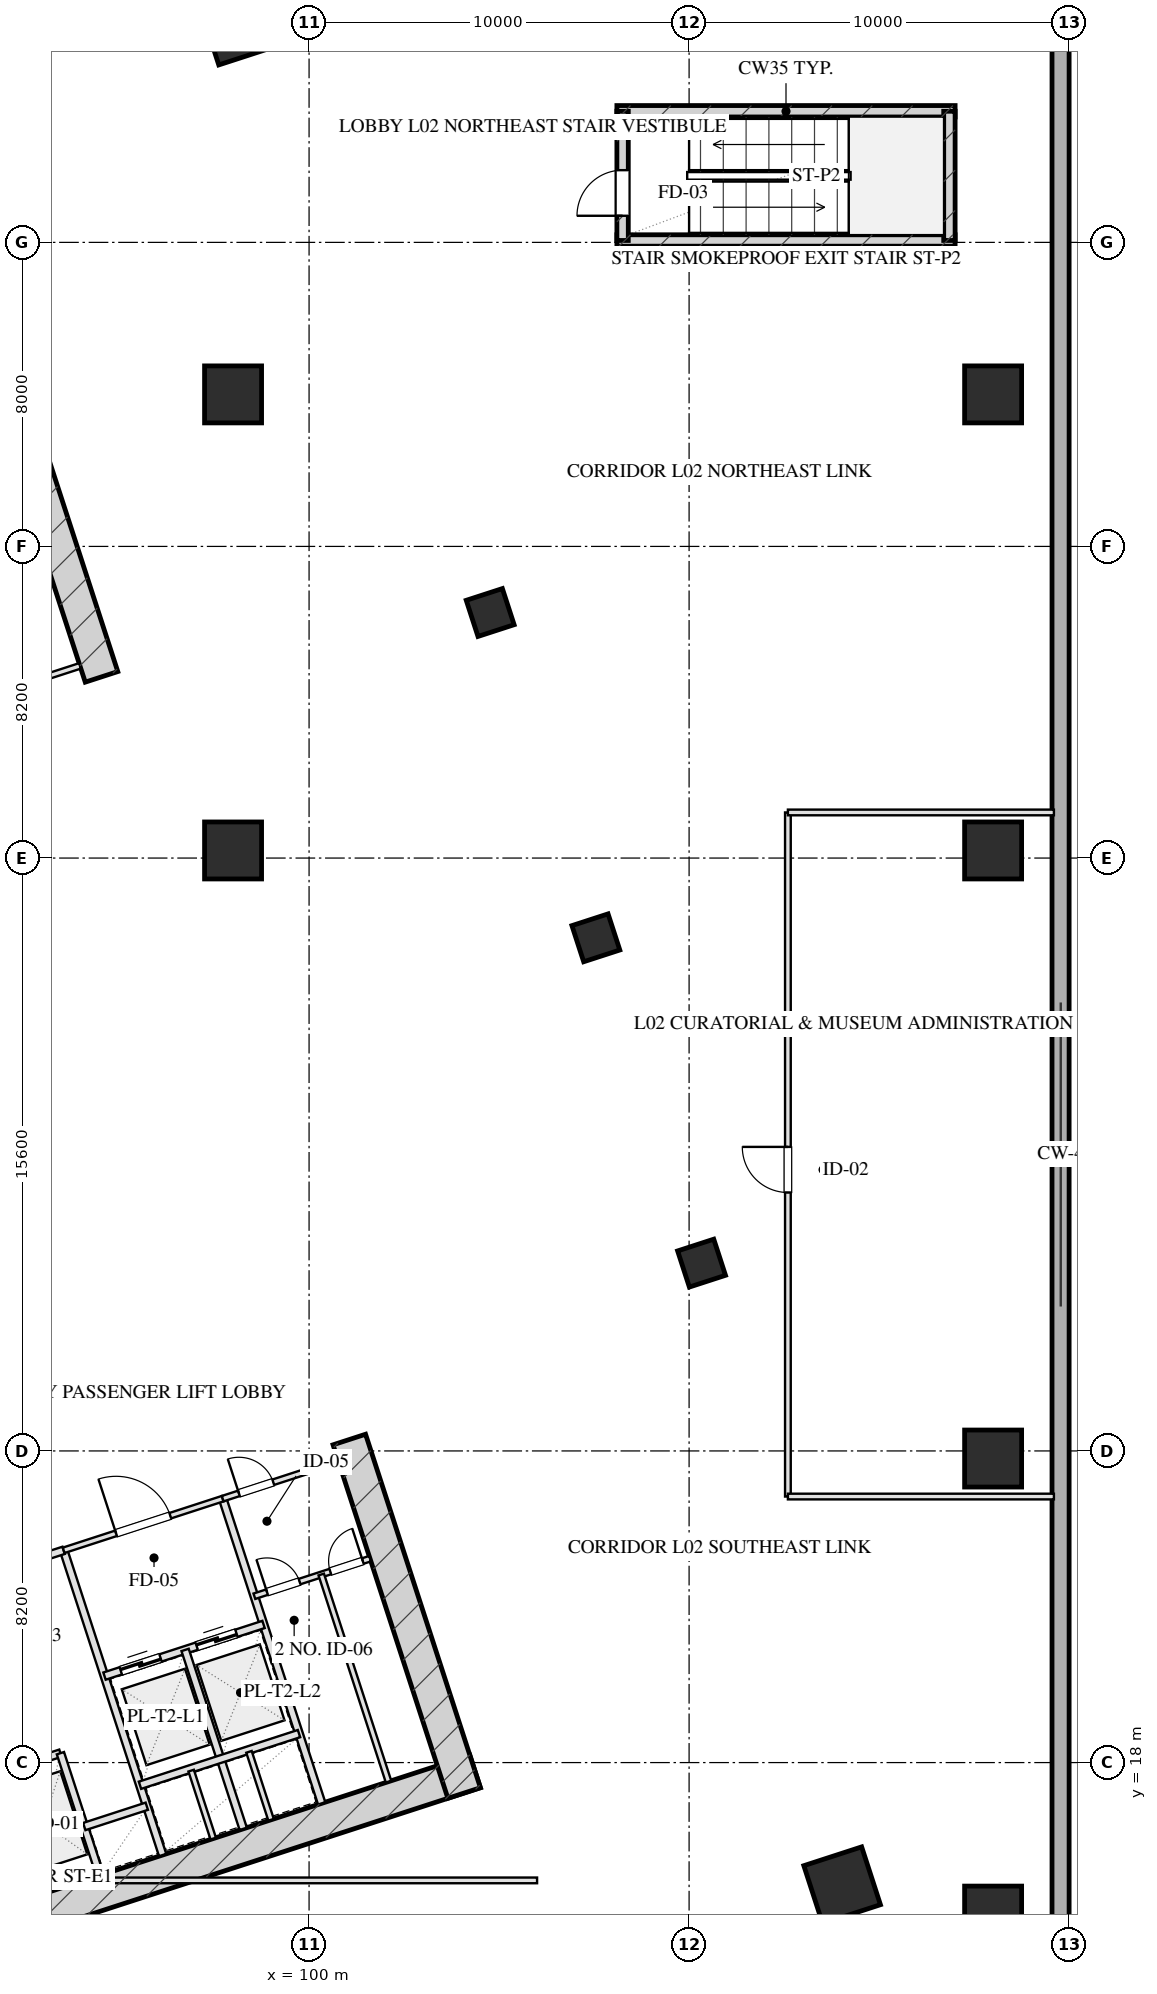
"""IFC4 building model, lengths in metres.
Left out: names, types, materials, properties, quantities, classifications, styles, units other than length and angle.
Written with IfcOpenShell. Run it as: python <this file> out.ifc"""

import sys

from ifc_helpers import new_model, si_unit, direction, frame, frame_2d, origin, origin_2d, place, context, subcontext, project, spatial, rectangle, hollow_rectangle, extrude, element, fill, save


model = new_model("IFC4")
c1 = context("Model", 3, precision=1e-05, world=origin(), true_north=direction((0.0, 1.0)))
c2 = subcontext(c1, "Body", "Model", "MODEL_VIEW")
j1 = project(units=[si_unit("LENGTHUNIT", "METRE"), si_unit("PLANEANGLEUNIT", "RADIAN")], contexts=[c1])
p1 = place(None, origin())
s1 = spatial("IfcSite", under=j1, at=p1, CompositionType="ELEMENT")
p2 = place(p1, origin())
s2 = spatial("IfcBuilding", under=s1, at=p2, CompositionType="ELEMENT")
p3 = place(p2, frame((0.0, 0.0, 11.5)))
s3 = spatial("IfcBuildingStorey", under=s2, at=p3, CompositionType="ELEMENT", Elevation=11.5)
p4 = place(p3, frame((88.487, 12.605, 0.0), z_axis=(0.0, 0.0, 1.0), x_axis=(0.951055016115, 0.309021611416, 0.0)))
e1 = element("IfcWall", 1, at=p4, inside=s3, PredefinedType="SHEAR", context=c2, shape_type="SweptSolid", body=[
    extrude(rectangle(XDim=16.7, YDim=0.9, at=frame_2d((8.35, 0.0))), origin(), (0.0, 0.0, 1.0), 5.0),
])
for number, where, z_axis, x_axis in (
    (2, (101.059, 26.5, 0.0), (0.0, 0.0, 1.0), (0.309, -0.951, 0.0)),
    (3, (94.539, 46.568, 0.0), (0.0, 0.0, 1.0), (-0.309, 0.951, 0.0)),
):
    element("IfcWall", number, at=place(p3, frame(where, z_axis=z_axis, x_axis=x_axis)), inside=s3, PredefinedType="SHEAR", context=c2, shape_type="SweptSolid", body=[
        extrude(rectangle(XDim=9.78, YDim=0.9, at=frame_2d((4.89, 0.0))), origin(), (0.0, 0.0, 1.0), 5.0),
    ])
for number, where, z_axis, x_axis in (
    (4, (108.1, 58.05, 0.0), (0.0, 0.0, 1.0), (1.0, 0.0, 0.0)),
    (5, (108.1, 61.45, 0.0), (0.0, 0.0, 1.0), (1.0, 0.0, 0.0)),
):
    element("IfcWall", number, at=place(p3, frame(where, z_axis=z_axis, x_axis=x_axis)), inside=s3, PredefinedType="SHEAR", context=c2, shape_type="SweptSolid", body=[
        extrude(rectangle(XDim=8.9, YDim=0.3, at=frame_2d((4.45, 0.0))), origin(), (0.0, 0.0, 1.0), 5.0),
    ])
p5 = place(p3, frame((116.85, 58.05, 0.0), z_axis=(0.0, 0.0, 1.0), x_axis=(0.0, 1.0, 0.0)))
e6 = element("IfcWall", 6, at=p5, inside=s3, PredefinedType="SHEAR", context=c2, shape_type="SweptSolid", body=[
    extrude(rectangle(XDim=3.4, YDim=0.3, at=frame_2d((1.7, 0.0))), origin(), (0.0, 0.0, 1.0), 5.0),
])
p6 = place(p3, frame((108.25, 58.05, 0.0), z_axis=(0.0, 0.0, 1.0), x_axis=(0.0, 1.0, 0.0)))
e7 = element("IfcWall", 7, at=p6, inside=s3, PredefinedType="SHEAR", context=c2, shape_type="SweptSolid", body=[
    extrude(rectangle(XDim=3.4, YDim=0.3, at=frame_2d((1.7, 0.0))), origin(), (0.0, 0.0, 1.0), 5.0),
])
p7 = place(p6, frame((0.65, 0.0, 0.0)))
e8 = element("IfcOpeningElement", 8, at=p7, cuts=e7, PredefinedType="OPENING", context=c2, shape_type="SweptSolid", body=[
    extrude(rectangle(XDim=1.2, YDim=2.05, at=frame_2d((0.6, 1.025))), frame((0.0, 0.16, 0.0), z_axis=(0.0, -1.0, 0.0), x_axis=(1.0, 0.0, 0.0)), (0.0, 0.0, 1.0), 0.32),
])
for number, where, z_axis, x_axis in (
    (9, (98.0, 42.0, 0.0), (0.0, 0.0, 1.0), (1.0, 0.0, 0.0)),
    (10, (98.0, 54.0, 0.0), (0.0, 0.0, 1.0), (1.0, 0.0, 0.0)),
    (11, (118.0, 14.0, 0.0), (0.0, 0.0, 1.0), (1.0, 0.0, 0.0)),
    (12, (118.0, 26.0, 0.0), (0.0, 0.0, 1.0), (1.0, 0.0, 0.0)),
    (13, (118.0, 42.0, 0.0), (0.0, 0.0, 1.0), (1.0, 0.0, 0.0)),
    (14, (118.0, 54.0, 0.0), (0.0, 0.0, 1.0), (1.0, 0.0, 0.0)),
):
    element("IfcColumn", number, at=place(p3, frame(where, z_axis=z_axis, x_axis=x_axis)), inside=s3, PredefinedType="COLUMN", context=c2, shape_type="SweptSolid", body=[
        extrude(rectangle(XDim=1.5, YDim=1.5, at=origin_2d()), origin(), (0.0, 0.0, 1.0), 5.001),
    ])
for number, where, z_axis, x_axis in (
    (15, (114.027, 14.774, 0.0), (0.0, 0.0, 1.0), (0.951, 0.309, 0.0)),
    (16, (98.137, 63.677, 0.0), (0.0, 0.0, 1.0), (0.951, 0.309, 0.0)),
):
    element("IfcColumn", number, at=place(p3, frame(where, z_axis=z_axis, x_axis=x_axis)), inside=s3, PredefinedType="COLUMN", context=c2, shape_type="SweptSolid", body=[
        extrude(hollow_rectangle(XDim=1.6, YDim=1.6, WallThickness=0.055, at=origin_2d()), origin(), (0.0, 0.0, 1.0), 5.001),
    ])
for number, where, z_axis, x_axis in (
    (17, (110.328, 31.142, 0.0), (0.0, 0.0, 1.0), (0.951, 0.309, 0.0)),
    (18, (107.547, 39.701, 0.0), (0.0, 0.0, 1.0), (0.951, 0.309, 0.0)),
    (19, (104.766, 48.261, 0.0), (0.0, 0.0, 1.0), (0.951, 0.309, 0.0)),
):
    element("IfcColumn", number, at=place(p3, frame(where, z_axis=z_axis, x_axis=x_axis)), inside=s3, PredefinedType="COLUMN", context=c2, shape_type="SweptSolid", body=[
        extrude(hollow_rectangle(XDim=1.0, YDim=1.0, WallThickness=0.036, at=origin_2d()), origin(), (0.0, 0.0, 1.0), 5.001),
    ])
p8 = place(p3, frame((119.775, 68.0, 0.0), z_axis=(0.0, 0.0, 1.0), x_axis=(0.0, -1.0, 0.0)))
e20 = element("IfcWall", 20, at=p8, inside=s3, PredefinedType="SOLIDWALL", context=c2, shape_type="SweptSolid", body=[
    extrude(rectangle(XDim=68.0, YDim=0.45, at=frame_2d((34.0, 0.0))), origin(), (0.0, 0.0, 1.0), 4.7),
])
p9 = place(p3, frame((93.542, 23.585, 0.0), z_axis=(0.0, 0.0, 1.0), x_axis=(0.309042196757, -0.951048327176, 0.0)))
e21 = element("IfcWall", 21, at=p9, inside=s3, PredefinedType="PARTITIONING", context=c2, shape_type="SweptSolid", body=[
    extrude(rectangle(XDim=8.43, YDim=0.2, at=frame_2d((4.215, 0.0))), origin(), (0.0, 0.0, 1.0), 4.685),
])
p10 = place(p3, frame((89.899, 22.401, 0.0), z_axis=(0.0, 0.0, 1.0), x_axis=(0.951046716504, 0.309047153403, 0.0)))
e22 = element("IfcWall", 22, at=p10, inside=s3, PredefinedType="PARTITIONING", context=c2, shape_type="SweptSolid", body=[
    extrude(rectangle(XDim=3.83, YDim=0.2, at=frame_2d((1.915, 0.0))), origin(), (0.0, 0.0, 1.0), 4.685),
])
p11 = place(p10, frame((1.35, 0.0, 0.0)))
e23 = element("IfcOpeningElement", 23, at=p11, cuts=e22, PredefinedType="OPENING", context=c2, shape_type="SweptSolid", body=[
    extrude(rectangle(XDim=1.2, YDim=2.05, at=frame_2d((0.6, 1.025))), frame((0.0, 0.11, 0.0), z_axis=(0.0, -1.0, 0.0), x_axis=(1.0, 0.0, 0.0)), (0.0, 0.0, 1.0), 0.22),
])
p12 = place(p3, frame((91.46, 17.598, 0.0), z_axis=(0.0, 0.0, 1.0), x_axis=(0.951062257173, 0.308999325213, 0.0)))
e24 = element("IfcWall", 24, at=p12, inside=s3, PredefinedType="PARTITIONING", context=c2, shape_type="SweptSolid", body=[
    extrude(rectangle(XDim=2.1, YDim=0.2, at=frame_2d((1.05, 0.0))), origin(), (0.0, 0.0, 1.0), 4.685),
])
p13 = place(p12, frame((0.35, 0.0, 0.0)))
e25 = element("IfcOpeningElement", 25, at=p13, cuts=e24, PredefinedType="OPENING", context=c2, shape_type="SweptSolid", body=[
    extrude(rectangle(XDim=1.1, YDim=2.05, at=frame_2d((0.55, 1.025))), frame((0.0, 0.11, 0.0), z_axis=(0.0, -1.0, 0.0), x_axis=(1.0, 0.0, 0.0)), (0.0, 0.0, 1.0), 0.22),
])
p14 = place(p3, frame((93.457, 18.247, 0.0), z_axis=(0.0, 0.0, 1.0), x_axis=(0.3089935693, -0.951064127245, 0.0)))
e26 = element("IfcWall", 26, at=p14, inside=s3, PredefinedType="PARTITIONING", context=c2, shape_type="SweptSolid", body=[
    extrude(rectangle(XDim=3.7, YDim=0.2, at=frame_2d((1.85, 0.0))), origin(), (0.0, 0.0, 1.0), 4.685),
])
p15 = place(p3, frame((94.084, 16.317, 0.0), z_axis=(0.0, 0.0, 1.0), x_axis=(0.951041328149, 0.309063734775, 0.0)))
e27 = element("IfcWall", 27, at=p15, inside=s3, PredefinedType="PARTITIONING", context=c2, shape_type="SweptSolid", body=[
    extrude(rectangle(XDim=1.73, YDim=0.2, at=frame_2d((0.865, 0.0))), origin(), (0.0, 0.0, 1.0), 4.685),
])
p16 = place(p3, frame((97.727, 24.944, 0.0), z_axis=(0.0, 0.0, 1.0), x_axis=(0.309016001439, -0.951056838919, 0.0)))
e28 = element("IfcWall", 28, at=p16, inside=s3, PredefinedType="PARTITIONING", context=c2, shape_type="SweptSolid", body=[
    extrude(rectangle(XDim=8.43, YDim=0.2, at=frame_2d((4.215, 0.0))), origin(), (0.0, 0.0, 1.0), 4.685),
])
p17 = place(p3, frame((93.542, 23.585, 0.0), z_axis=(0.0, 0.0, 1.0), x_axis=(0.951063829732, 0.308994485023, 0.0)))
e29 = element("IfcWall", 29, at=p17, inside=s3, PredefinedType="PARTITIONING", context=c2, shape_type="SweptSolid", body=[
    extrude(rectangle(XDim=4.4, YDim=0.15, at=frame_2d((2.2, 0.0))), origin(), (0.0, 0.0, 1.0), 4.685),
])
p18 = place(p17, frame((1.45, 0.0, 0.0)))
e30 = element("IfcOpeningElement", 30, at=p18, cuts=e29, PredefinedType="OPENING", context=c2, shape_type="SweptSolid", body=[
    extrude(rectangle(XDim=1.5, YDim=2.05, at=frame_2d((0.75, 1.025))), frame((0.0, 0.085, 0.0), z_axis=(0.0, -1.0, 0.0), x_axis=(1.0, 0.0, 0.0)), (0.0, 0.0, 1.0), 0.17),
])
p19 = place(p3, frame((94.617, 20.275, 0.0), z_axis=(0.0, 0.0, 1.0), x_axis=(0.951058531764, 0.30901079133, 0.0)))
e31 = element("IfcWall", 31, at=p19, inside=s3, PredefinedType="PARTITIONING", context=c2, shape_type="SweptSolid", body=[
    extrude(rectangle(XDim=4.4, YDim=0.2, at=frame_2d((2.2, 0.0))), origin(), (0.0, 0.0, 1.0), 4.685),
])
p20 = place(p19, frame((0.45, 0.0, 0.0)))
e32 = element("IfcOpeningElement", 32, at=p20, cuts=e31, PredefinedType="OPENING", context=c2, shape_type="SweptSolid", body=[
    extrude(rectangle(XDim=1.1, YDim=2.05, at=frame_2d((0.55, 1.025))), frame((0.0, 0.11, 0.0), z_axis=(0.0, -1.0, 0.0), x_axis=(1.0, 0.0, 0.0)), (0.0, 0.0, 1.0), 0.22),
])
p21 = place(p19, frame((2.55, 0.0, 0.0)))
e33 = element("IfcOpeningElement", 33, at=p21, cuts=e31, PredefinedType="OPENING", context=c2, shape_type="SweptSolid", body=[
    extrude(rectangle(XDim=1.1, YDim=2.05, at=frame_2d((0.55, 1.025))), frame((0.0, 0.11, 0.0), z_axis=(0.0, -1.0, 0.0), x_axis=(1.0, 0.0, 0.0)), (0.0, 0.0, 1.0), 0.22),
])
p22 = place(p3, frame((96.738, 20.964, 0.0), z_axis=(0.0, 0.0, 1.0), x_axis=(0.309042578481, -0.951048203135, 0.0)))
e34 = element("IfcWall", 34, at=p22, inside=s3, PredefinedType="PARTITIONING", context=c2, shape_type="SweptSolid", body=[
    extrude(rectangle(XDim=4.95, YDim=0.2, at=frame_2d((2.475, 0.0))), origin(), (0.0, 0.0, 1.0), 4.685),
])
p23 = place(p3, frame((95.551, 17.403, 0.0), z_axis=(0.0, 0.0, 1.0), x_axis=(0.951058531764, 0.30901079133, 0.0)))
e35 = element("IfcWall", 35, at=p23, inside=s3, PredefinedType="PARTITIONING", context=c2, shape_type="SweptSolid", body=[
    extrude(rectangle(XDim=4.4, YDim=0.2, at=frame_2d((2.2, 0.0))), origin(), (0.0, 0.0, 1.0), 4.685),
])
p24 = place(p3, frame((96.897, 17.788, 0.0), z_axis=(0.0, 0.0, 1.0), x_axis=(0.30897153969, -0.951071284217, 0.0)))
e36 = element("IfcWall", 36, at=p24, inside=s3, PredefinedType="PARTITIONING", context=c2, shape_type="SweptSolid", body=[
    extrude(rectangle(XDim=1.88, YDim=0.15, at=frame_2d((0.94, 0.0))), origin(), (0.0, 0.0, 1.0), 4.685),
])
p25 = place(p3, frame((98.419, 18.282, 0.0), z_axis=(0.0, 0.0, 1.0), x_axis=(0.308933380006, -0.951083680187, 0.0)))
e37 = element("IfcWall", 37, at=p25, inside=s3, PredefinedType="PARTITIONING", context=c2, shape_type="SweptSolid", body=[
    extrude(rectangle(XDim=1.88, YDim=0.15, at=frame_2d((0.94, 0.0))), origin(), (0.0, 0.0, 1.0), 4.685),
])
p26 = place(p3, frame((97.727, 24.944, 0.0), z_axis=(0.0, 0.0, 1.0), x_axis=(0.951036872128, 0.309077446369, 0.0)))
e38 = element("IfcWall", 38, at=p26, inside=s3, PredefinedType="PARTITIONING", context=c2, shape_type="SweptSolid", body=[
    extrude(rectangle(XDim=3.2, YDim=0.15, at=frame_2d((1.6, 0.0))), origin(), (0.0, 0.0, 1.0), 4.685),
])
p27 = place(p26, frame((0.45, 0.0, 0.0)))
e39 = element("IfcOpeningElement", 39, at=p27, cuts=e38, PredefinedType="OPENING", context=c2, shape_type="SweptSolid", body=[
    extrude(rectangle(XDim=0.95, YDim=2.05, at=frame_2d((0.475, 1.025))), frame((0.0, 0.085, 0.0), z_axis=(0.0, -1.0, 0.0), x_axis=(1.0, 0.0, 0.0)), (0.0, 0.0, 1.0), 0.17),
])
p28 = place(p3, frame((98.561, 22.376, 0.0), z_axis=(0.0, 0.0, 1.0), x_axis=(0.95104415986, 0.309055020985, 0.0)))
e40 = element("IfcWall", 40, at=p28, inside=s3, PredefinedType="PARTITIONING", context=c2, shape_type="SweptSolid", body=[
    extrude(rectangle(XDim=3.2, YDim=0.15, at=frame_2d((1.6, 0.0))), origin(), (0.0, 0.0, 1.0), 4.685),
])
p29 = place(p28, frame((0.35, 0.0, 0.0)))
e41 = element("IfcOpeningElement", 41, at=p29, cuts=e40, PredefinedType="OPENING", context=c2, shape_type="SweptSolid", body=[
    extrude(rectangle(XDim=0.9, YDim=2.05, at=frame_2d((0.45, 1.025))), frame((0.0, 0.085, 0.0), z_axis=(0.0, -1.0, 0.0), x_axis=(1.0, 0.0, 0.0)), (0.0, 0.0, 1.0), 0.17),
])
p30 = place(p28, frame((2.1, 0.0, 0.0)))
e42 = element("IfcOpeningElement", 42, at=p30, cuts=e40, PredefinedType="OPENING", context=c2, shape_type="SweptSolid", body=[
    extrude(rectangle(XDim=0.9, YDim=2.05, at=frame_2d((0.45, 1.025))), frame((0.0, 0.085, 0.0), z_axis=(0.0, -1.0, 0.0), x_axis=(1.0, 0.0, 0.0)), (0.0, 0.0, 1.0), 0.17),
])
p31 = place(p3, frame((100.32, 22.948, 0.0), z_axis=(0.0, 0.0, 1.0), x_axis=(0.309035009867, -0.951050662518, 0.0)))
e43 = element("IfcWall", 43, at=p31, inside=s3, PredefinedType="PARTITIONING", context=c2, shape_type="SweptSolid", body=[
    extrude(rectangle(XDim=5.73, YDim=0.15, at=frame_2d((2.865, 0.0))), origin(), (0.0, 0.0, 1.0), 4.685),
])
p32 = place(p3, frame((90.928, 45.868, 0.0), z_axis=(0.0, 0.0, 1.0), x_axis=(0.951059297078, 0.309008435874, 0.0)))
e44 = element("IfcWall", 44, at=p32, inside=s3, PredefinedType="PARTITIONING", context=c2, shape_type="SweptSolid", body=[
    extrude(rectangle(XDim=3.2, YDim=0.15, at=frame_2d((1.6, 0.0))), origin(), (0.0, 0.0, 1.0), 4.685),
])
p33 = place(p32, frame((0.45, 0.0, 0.0)))
e45 = element("IfcOpeningElement", 45, at=p33, cuts=e44, PredefinedType="OPENING", context=c2, shape_type="SweptSolid", body=[
    extrude(rectangle(XDim=0.95, YDim=2.05, at=frame_2d((0.475, 1.025))), frame((0.0, 0.085, 0.0), z_axis=(0.0, -1.0, 0.0), x_axis=(1.0, 0.0, 0.0)), (0.0, 0.0, 1.0), 0.17),
])
p34 = place(p3, frame((112.6, 25.0, 0.0), z_axis=(0.0, 0.0, 1.0), x_axis=(0.0, 1.0, 0.0)))
e46 = element("IfcWall", 46, at=p34, inside=s3, PredefinedType="PARTITIONING", context=c2, shape_type="SweptSolid", body=[
    extrude(rectangle(XDim=18.0, YDim=0.15, at=frame_2d((9.0, 0.0))), origin(), (0.0, 0.0, 1.0), 4.685),
])
p35 = place(p34, frame((8.0, 0.0, 0.0)))
e47 = element("IfcOpeningElement", 47, at=p35, cuts=e46, PredefinedType="OPENING", context=c2, shape_type="SweptSolid", body=[
    extrude(rectangle(XDim=1.2, YDim=2.05, at=frame_2d((0.6, 1.025))), frame((0.0, 0.085, 0.0), z_axis=(0.0, -1.0, 0.0), x_axis=(1.0, 0.0, 0.0)), (0.0, 0.0, 1.0), 0.17),
])
for number, where, z_axis, x_axis in (
    (48, (112.6, 25.0, 0.0), (0.0, 0.0, 1.0), (1.0, 0.0, 0.0)),
    (49, (112.6, 43.0, 0.0), (0.0, 0.0, 1.0), (1.0, 0.0, 0.0)),
):
    element("IfcWall", number, at=place(p3, frame(where, z_axis=z_axis, x_axis=x_axis)), inside=s3, PredefinedType="PARTITIONING", context=c2, shape_type="SweptSolid", body=[
        extrude(rectangle(XDim=7.0, YDim=0.15, at=frame_2d((3.5, 0.0))), origin(), (0.0, 0.0, 1.0), 4.685),
    ])
p36 = place(p3, frame((18.0, 14.9, 0.0), z_axis=(0.0, 0.0, 1.0), x_axis=(1.0, 0.0, 0.0)))
e50 = element("IfcWall", 50, at=p36, inside=s3, PredefinedType="PARTITIONING", context=c2, shape_type="SweptSolid", body=[
    extrude(rectangle(XDim=88.0, YDim=0.15, at=frame_2d((44.0, 0.0))), origin(), (0.0, 0.0, 1.0), 2.15),
])
p37 = place(p36, frame((21.6, 0.0, 0.0)))
e51 = element("IfcOpeningElement", 51, at=p37, cuts=e50, PredefinedType="OPENING", context=c2, shape_type="SweptSolid", body=[
    extrude(rectangle(XDim=1.5, YDim=2.05, at=frame_2d((0.75, 1.025))), frame((0.0, 0.085, 0.0), z_axis=(0.0, -1.0, 0.0), x_axis=(1.0, 0.0, 0.0)), (0.0, 0.0, 1.0), 0.17),
])
p38 = place(p18, origin())
e52 = element("IfcDoor", 52, at=p38, inside=s3, OperationType="SINGLE_SWING_LEFT", PredefinedType="DOOR", context=c2, shape_type="SweptSolid", body=[
    extrude(rectangle(XDim=1.5, YDim=2.05, at=frame_2d((0.75, 1.025))), frame((0.0, 0.025, 0.0), z_axis=(0.0, -1.0, 0.0), x_axis=(1.0, 0.0, 0.0)), (0.0, 0.0, 1.0), 0.05),
])
fill(e30, e52)
p39 = place(p20, origin())
e53 = element("IfcDoor", 53, at=p39, inside=s3, OperationType="DOUBLE_DOOR_SLIDING", PredefinedType="DOOR", context=c2, shape_type="SweptSolid", body=[
    extrude(rectangle(XDim=1.1, YDim=2.05, at=frame_2d((0.55, 1.025))), frame((0.0, 0.025, 0.0), z_axis=(0.0, -1.0, 0.0), x_axis=(1.0, 0.0, 0.0)), (0.0, 0.0, 1.0), 0.05),
])
fill(e32, e53)
p40 = place(p21, origin())
e54 = element("IfcDoor", 54, at=p40, inside=s3, OperationType="DOUBLE_DOOR_SLIDING", PredefinedType="DOOR", context=c2, shape_type="SweptSolid", body=[
    extrude(rectangle(XDim=1.1, YDim=2.05, at=frame_2d((0.55, 1.025))), frame((0.0, 0.025, 0.0), z_axis=(0.0, -1.0, 0.0), x_axis=(1.0, 0.0, 0.0)), (0.0, 0.0, 1.0), 0.05),
])
fill(e33, e54)
p41 = place(p27, origin())
e55 = element("IfcDoor", 55, at=p41, inside=s3, OperationType="SINGLE_SWING_LEFT", PredefinedType="DOOR", context=c2, shape_type="SweptSolid", body=[
    extrude(rectangle(XDim=0.95, YDim=2.05, at=frame_2d((0.475, 1.025))), frame((0.0, 0.025, 0.0), z_axis=(0.0, -1.0, 0.0), x_axis=(1.0, 0.0, 0.0)), (0.0, 0.0, 1.0), 0.05),
])
fill(e39, e55)
p42 = place(p29, origin())
e56 = element("IfcDoor", 56, at=p42, inside=s3, OperationType="SINGLE_SWING_LEFT", PredefinedType="DOOR", context=c2, shape_type="SweptSolid", body=[
    extrude(rectangle(XDim=0.9, YDim=2.05, at=frame_2d((0.45, 1.025))), frame((0.0, 0.025, 0.0), z_axis=(0.0, -1.0, 0.0), x_axis=(1.0, 0.0, 0.0)), (0.0, 0.0, 1.0), 0.05),
])
fill(e41, e56)
p43 = place(p30, origin())
e57 = element("IfcDoor", 57, at=p43, inside=s3, OperationType="SINGLE_SWING_RIGHT", PredefinedType="DOOR", context=c2, shape_type="SweptSolid", body=[
    extrude(rectangle(XDim=0.9, YDim=2.05, at=frame_2d((0.45, 1.025))), frame((0.0, 0.025, 0.0), z_axis=(0.0, -1.0, 0.0), x_axis=(1.0, 0.0, 0.0)), (0.0, 0.0, 1.0), 0.05),
])
fill(e42, e57)
p44 = place(p35, origin())
e58 = element("IfcDoor", 58, at=p44, inside=s3, OperationType="SINGLE_SWING_RIGHT", PredefinedType="DOOR", context=c2, shape_type="SweptSolid", body=[
    extrude(rectangle(XDim=1.2, YDim=2.05, at=frame_2d((0.6, 1.025))), frame((0.0, 0.025, 0.0), z_axis=(0.0, -1.0, 0.0), x_axis=(1.0, 0.0, 0.0)), (0.0, 0.0, 1.0), 0.05),
])
fill(e47, e58)
p45 = place(p7, origin())
e59 = element("IfcDoor", 59, at=p45, inside=s3, OperationType="SINGLE_SWING_LEFT", PredefinedType="DOOR", context=c2, shape_type="SweptSolid", body=[
    extrude(rectangle(XDim=1.2, YDim=2.05, at=frame_2d((0.6, 1.025))), frame((0.0, 0.025, 0.0), z_axis=(0.0, -1.0, 0.0), x_axis=(1.0, 0.0, 0.0)), (0.0, 0.0, 1.0), 0.05),
])
fill(e8, e59)
save(model, sys.argv[1])
